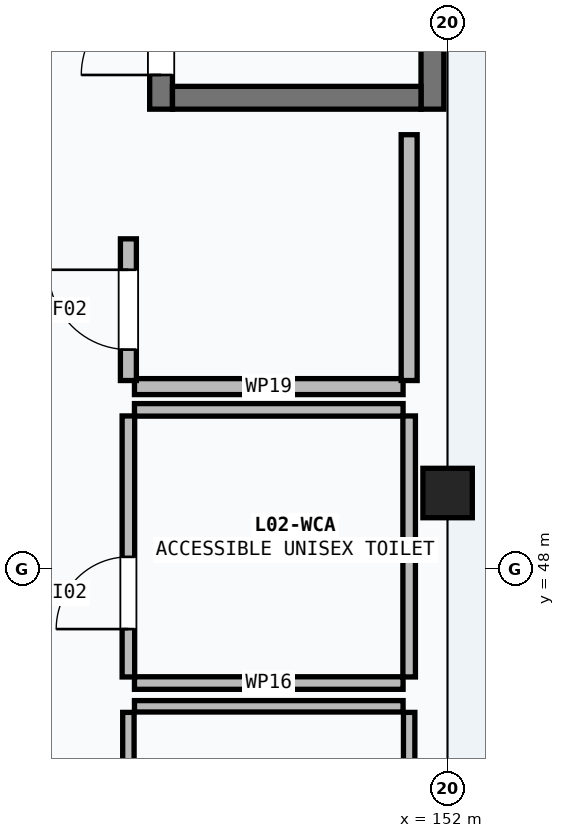
"""IFC4 building model, lengths in metres.
Left out: names, types, materials, properties, quantities, classifications, styles, units other than length and angle.
Written with IfcOpenShell. Run it as: python <this file> out.ifc"""

import sys

from ifc_helpers import new_model, si_unit, direction, frame, frame_2d, origin, origin_2d, place, context, subcontext, project, spatial, rectangle, extrude, element, fill, save


model = new_model("IFC4")
c1 = context("Model", 3, precision=1e-05, world=origin(), true_north=direction((0.0, 1.0)))
c2 = subcontext(c1, "Body", "Model", "MODEL_VIEW")
j1 = project(units=[si_unit("LENGTHUNIT", "METRE"), si_unit("PLANEANGLEUNIT", "RADIAN")], contexts=[c1])
p1 = place(None, origin())
s1 = spatial("IfcSite", under=j1, at=p1, CompositionType="ELEMENT")
p2 = place(p1, origin())
s2 = spatial("IfcBuilding", under=s1, at=p2, CompositionType="ELEMENT")
p3 = place(p2, frame((0.0, 0.0, 8.4)))
s3 = spatial("IfcBuildingStorey", under=s2, at=p3, CompositionType="ELEMENT", Elevation=8.4)
p4 = place(p3, frame((152.0, 49.0, 0.0), z_axis=(0.0, 0.0, 1.0), x_axis=(1.0, 0.0, 0.0)))
e1 = element("IfcColumn", 1, at=p4, inside=s3, PredefinedType="COLUMN", context=c2, shape_type="SweptSolid", body=[
    extrude(rectangle(XDim=0.65, YDim=0.65, at=origin_2d()), origin(), (0.0, 0.0, 1.0), 3.6),
])
p5 = place(p3, frame((148.23, 54.05, 0.0), z_axis=(0.0, 0.0, 1.0), x_axis=(0.0, 1.0, 0.0)))
e2 = element("IfcWall", 2, at=p5, inside=s3, PredefinedType="SHEAR", context=c2, shape_type="SweptSolid", body=[
    extrude(rectangle(XDim=9.9, YDim=0.3, at=frame_2d((4.95, 0.0))), origin(), (0.0, 0.0, 1.0), 3.6),
])
p6 = place(p5, frame((0.45, 0.0, 0.0)))
e3 = element("IfcOpeningElement", 3, at=p6, cuts=e2, PredefinedType="OPENING", context=c2, shape_type="SweptSolid", body=[
    extrude(rectangle(XDim=1.05, YDim=2.15, at=frame_2d((0.525, 1.075))), frame((0.0, 0.16, 0.0), z_axis=(0.0, -1.0, 0.0), x_axis=(1.0, 0.0, 0.0)), (0.0, 0.0, 1.0), 0.32),
])
p7 = place(p3, frame((151.8, 63.95, 0.0), z_axis=(0.0, 0.0, 1.0), x_axis=(0.0, -1.0, 0.0)))
e4 = element("IfcWall", 4, at=p7, inside=s3, PredefinedType="SHEAR", context=c2, shape_type="SweptSolid", body=[
    extrude(rectangle(XDim=9.9, YDim=0.3, at=frame_2d((4.95, 0.0))), origin(), (0.0, 0.0, 1.0), 3.6),
])
p8 = place(p3, frame((151.65, 54.2, 0.0), z_axis=(0.0, 0.0, 1.0), x_axis=(-1.0, 0.0, 0.0)))
e5 = element("IfcWall", 5, at=p8, inside=s3, PredefinedType="SHEAR", context=c2, shape_type="SweptSolid", body=[
    extrude(rectangle(XDim=3.27, YDim=0.3, at=frame_2d((1.635, 0.0))), origin(), (0.0, 0.0, 1.0), 3.6),
])
p9 = place(p3, frame((147.88, 46.194, 0.0), z_axis=(0.0, 0.0, 1.0), x_axis=(1.0, 0.0, 0.0)))
e6 = element("IfcWall", 6, at=p9, inside=s3, PredefinedType="PARTITIONING", context=c2, shape_type="SweptSolid", body=[
    extrude(rectangle(XDim=3.534, YDim=0.15, at=frame_2d((1.767, 0.0))), origin(), (0.0, 0.0, 1.0), 3.345),
])
p10 = place(p3, frame((147.8, 42.68, 0.0), z_axis=(0.0, 0.0, 1.0), x_axis=(0.0, 1.0, 0.0)))
e7 = element("IfcWall", 7, at=p10, inside=s3, PredefinedType="PARTITIONING", context=c2, shape_type="SweptSolid", body=[
    extrude(rectangle(XDim=3.434, YDim=0.15, at=frame_2d((1.717, 0.0))), origin(), (0.0, 0.0, 1.0), 2.755),
])
p11 = place(p10, frame((1.267, 0.0, 0.0)))
e8 = element("IfcOpeningElement", 8, at=p11, cuts=e7, PredefinedType="OPENING", context=c2, shape_type="SweptSolid", body=[
    extrude(rectangle(XDim=0.9, YDim=2.1, at=frame_2d((0.45, 1.05))), frame((0.0, 0.085, 0.0), z_axis=(0.0, -1.0, 0.0), x_axis=(1.0, 0.0, 0.0)), (0.0, 0.0, 1.0), 0.17),
])
p12 = place(p3, frame((151.494, 42.68, 0.0), z_axis=(0.0, 0.0, 1.0), x_axis=(0.0, 1.0, 0.0)))
e9 = element("IfcWall", 9, at=p12, inside=s3, PredefinedType="PARTITIONING", context=c2, shape_type="SweptSolid", body=[
    extrude(rectangle(XDim=3.434, YDim=0.15, at=frame_2d((1.717, 0.0))), origin(), (0.0, 0.0, 1.0), 2.755),
])
for number, where, z_axis, x_axis in (
    (10, (147.88, 46.5, 0.0), (0.0, 0.0, 1.0), (1.0, 0.0, 0.0)),
    (11, (147.88, 50.094, 0.0), (0.0, 0.0, 1.0), (1.0, 0.0, 0.0)),
):
    element("IfcWall", number, at=place(p3, frame(where, z_axis=z_axis, x_axis=x_axis)), inside=s3, PredefinedType="PARTITIONING", context=c2, shape_type="SweptSolid", body=[
        extrude(rectangle(XDim=3.534, YDim=0.165, at=frame_2d((1.767, 0.0))), origin(), (0.0, 0.0, 1.0), 3.345),
    ])
p13 = place(p3, frame((147.8, 46.58, 0.0), z_axis=(0.0, 0.0, 1.0), x_axis=(0.0, 1.0, 0.0)))
e12 = element("IfcWall", 12, at=p13, inside=s3, PredefinedType="PARTITIONING", context=c2, shape_type="SweptSolid", body=[
    extrude(rectangle(XDim=3.434, YDim=0.165, at=frame_2d((1.717, 0.0))), origin(), (0.0, 0.0, 1.0), 2.345),
])
p14 = place(p13, frame((0.63, 0.0, 0.0)))
e13 = element("IfcOpeningElement", 13, at=p14, cuts=e12, PredefinedType="OPENING", context=c2, shape_type="SweptSolid", body=[
    extrude(rectangle(XDim=0.95, YDim=2.1, at=frame_2d((0.475, 1.05))), frame((0.0, 0.093, 0.0), z_axis=(0.0, -1.0, 0.0), x_axis=(1.0, 0.0, 0.0)), (0.0, 0.0, 1.0), 0.185),
])
p15 = place(p3, frame((151.494, 46.58, 0.0), z_axis=(0.0, 0.0, 1.0), x_axis=(0.0, 1.0, 0.0)))
e14 = element("IfcWall", 14, at=p15, inside=s3, PredefinedType="PARTITIONING", context=c2, shape_type="SweptSolid", body=[
    extrude(rectangle(XDim=3.434, YDim=0.165, at=frame_2d((1.717, 0.0))), origin(), (0.0, 0.0, 1.0), 2.345),
])
p16 = place(p3, frame((147.88, 50.4, 0.0), z_axis=(0.0, 0.0, 1.0), x_axis=(1.0, 0.0, 0.0)))
e15 = element("IfcWall", 15, at=p16, inside=s3, PredefinedType="PARTITIONING", context=c2, shape_type="SweptSolid", body=[
    extrude(rectangle(XDim=3.534, YDim=0.21, at=frame_2d((1.767, 0.0))), origin(), (0.0, 0.0, 1.0), 3.345),
])
p17 = place(p3, frame((147.8, 50.48, 0.0), z_axis=(0.0, 0.0, 1.0), x_axis=(0.0, 1.0, 0.0)))
e16 = element("IfcWall", 16, at=p17, inside=s3, PredefinedType="PARTITIONING", context=c2, shape_type="SweptSolid", body=[
    extrude(rectangle(XDim=1.864, YDim=0.21, at=frame_2d((0.932, 0.0))), origin(), (0.0, 0.0, 1.0), 2.755),
])
p18 = place(p17, frame((0.407, 0.0, 0.0)))
e17 = element("IfcOpeningElement", 17, at=p18, cuts=e16, PredefinedType="OPENING", context=c2, shape_type="SweptSolid", body=[
    extrude(rectangle(XDim=1.05, YDim=2.15, at=frame_2d((0.525, 1.075))), frame((0.0, 0.115, 0.0), z_axis=(0.0, -1.0, 0.0), x_axis=(1.0, 0.0, 0.0)), (0.0, 0.0, 1.0), 0.23),
])
p19 = place(p3, frame((151.494, 50.48, 0.0), z_axis=(0.0, 0.0, 1.0), x_axis=(0.0, 1.0, 0.0)))
e18 = element("IfcWall", 18, at=p19, inside=s3, PredefinedType="PARTITIONING", context=c2, shape_type="SweptSolid", body=[
    extrude(rectangle(XDim=3.234, YDim=0.21, at=frame_2d((1.617, 0.0))), origin(), (0.0, 0.0, 1.0), 2.755),
])
p20 = place(p6, origin())
e19 = element("IfcDoor", 19, at=p20, inside=s3, OperationType="SINGLE_SWING_LEFT", PredefinedType="DOOR", context=c2, shape_type="SweptSolid", body=[
    extrude(rectangle(XDim=1.05, YDim=2.15, at=frame_2d((0.525, 1.075))), frame((0.0, 0.025, 0.0), z_axis=(0.0, -1.0, 0.0), x_axis=(1.0, 0.0, 0.0)), (0.0, 0.0, 1.0), 0.05),
])
fill(e3, e19)
p21 = place(p14, origin())
e20 = element("IfcDoor", 20, at=p21, inside=s3, OperationType="SINGLE_SWING_LEFT", PredefinedType="DOOR", context=c2, shape_type="SweptSolid", body=[
    extrude(rectangle(XDim=0.95, YDim=2.1, at=frame_2d((0.475, 1.05))), frame((0.0, 0.025, 0.0), z_axis=(0.0, -1.0, 0.0), x_axis=(1.0, 0.0, 0.0)), (0.0, 0.0, 1.0), 0.05),
])
fill(e13, e20)
p22 = place(p18, origin())
e21 = element("IfcDoor", 21, at=p22, inside=s3, OperationType="SINGLE_SWING_RIGHT", PredefinedType="DOOR", context=c2, shape_type="SweptSolid", body=[
    extrude(rectangle(XDim=1.05, YDim=2.15, at=frame_2d((0.525, 1.075))), frame((0.0, 0.025, 0.0), z_axis=(0.0, -1.0, 0.0), x_axis=(1.0, 0.0, 0.0)), (0.0, 0.0, 1.0), 0.05),
])
fill(e17, e21)
save(model, sys.argv[1])
